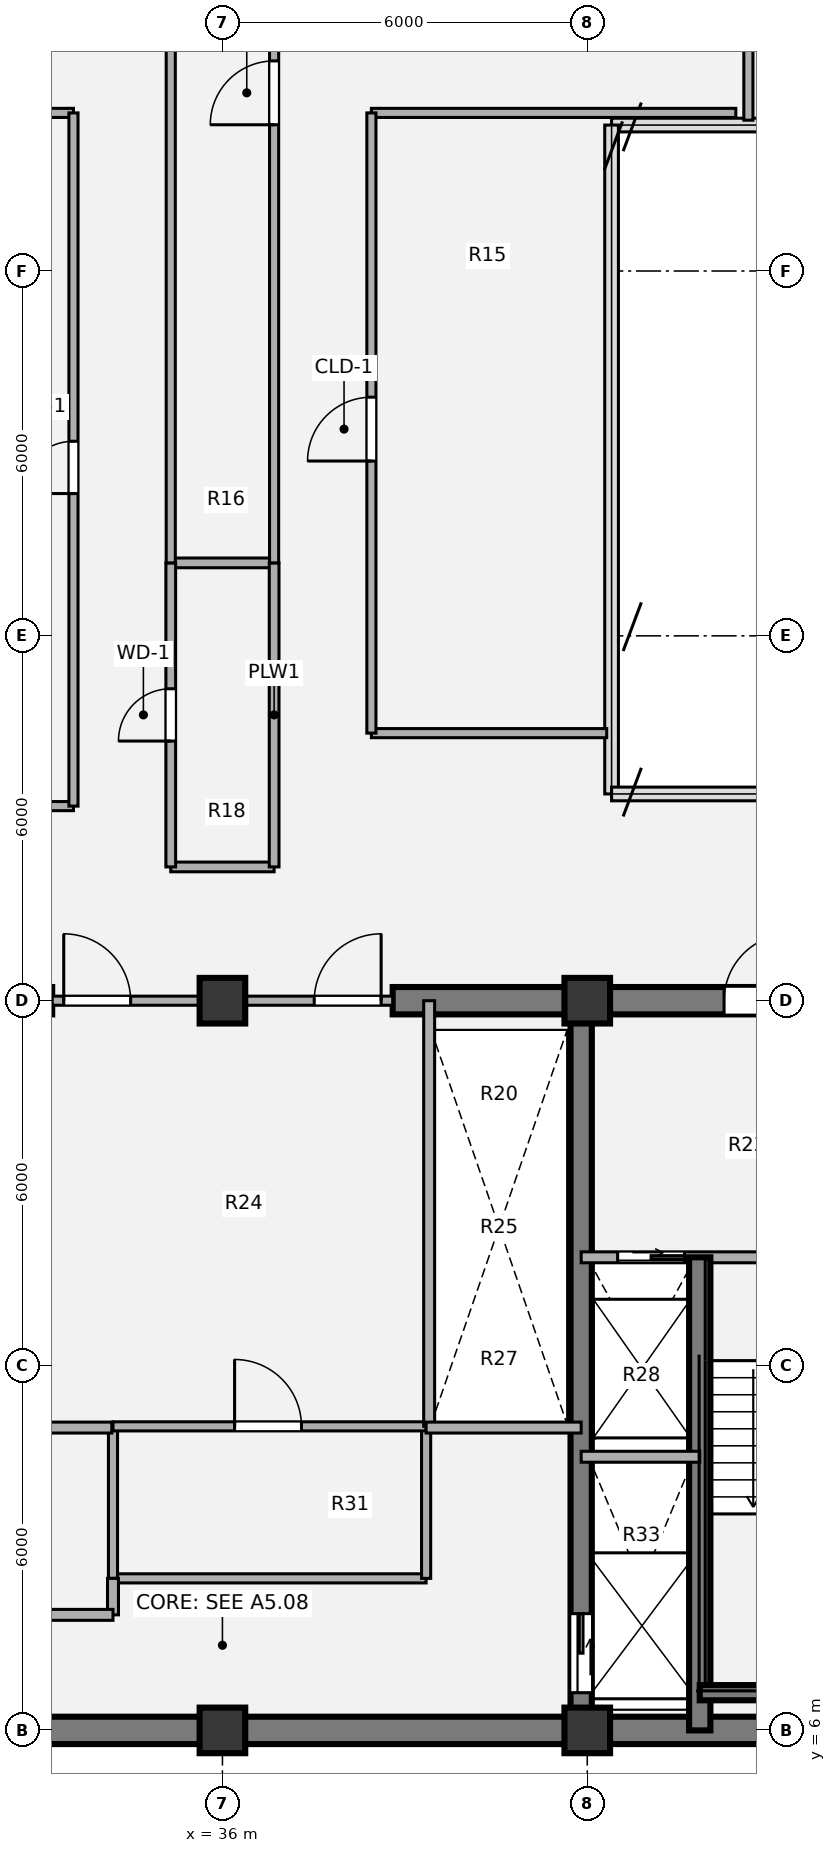
"""IFC4 building model, lengths in metres.
Left out: names, types, materials, properties, quantities, classifications, styles, units other than length and angle.
Written with IfcOpenShell. Run it as: python <this file> out.ifc"""

import sys

from ifc_helpers import new_model, si_unit, direction, frame, frame_2d, origin, origin_2d, place, context, subcontext, project, spatial, rectangle, extrude, source, transform, mapped, element, fill, save


model = new_model("IFC4")
c1 = context("Model", 3, precision=1e-05, world=origin(), true_north=direction((0.0, 1.0)))
c2 = subcontext(c1, "Body", "Model", "MODEL_VIEW")
j1 = project(units=[si_unit("LENGTHUNIT", "METRE"), si_unit("PLANEANGLEUNIT", "RADIAN")], contexts=[c1])
p1 = place(None, origin())
s1 = spatial("IfcSite", under=j1, at=p1, CompositionType="ELEMENT")
p2 = place(p1, origin())
s2 = spatial("IfcBuilding", under=s1, at=p2, CompositionType="ELEMENT")
p3 = place(p2, frame((0.0, 0.0, 179.1)))
s3 = spatial("IfcBuildingStorey", under=s2, at=p3, CompositionType="ELEMENT", Elevation=179.1)
m1 = source(origin(), c2, "Body", "SweptSolid", [
    extrude(rectangle(XDim=0.75, YDim=0.75, at=origin_2d()), origin(), (0.0, 0.0, 1.0), 3.78),
])
for number, where, z_axis, x_axis in (
    (1, (36.0, 6.0, 0.0), (0.0, 0.0, 1.0), (1.0, 0.0, 0.0)),
    (2, (42.0, 6.0, 0.0), (0.0, 0.0, 1.0), (1.0, 0.0, 0.0)),
    (3, (36.0, 18.0, 0.0), (0.0, 0.0, 1.0), (1.0, 0.0, 0.0)),
    (4, (42.0, 18.0, 0.0), (0.0, 0.0, 1.0), (1.0, 0.0, 0.0)),
):
    element("IfcColumn", number, at=place(p3, frame(where, z_axis=z_axis, x_axis=x_axis)), inside=s3, PredefinedType="COLUMN", context=c2, shape_type="MappedRepresentation", body=[
        mapped(m1, transform((0.0, 0.0, 0.0), x_axis=(1.0, 0.0, 0.0), y_axis=(0.0, 1.0, 0.0), z_axis=(0.0, 0.0, 1.0), scale=1.0)),
    ])
p4 = place(p3, frame((48.225, 6.0, 0.0), z_axis=(0.0, 0.0, 1.0), x_axis=(-1.0, 0.0, 0.0)))
e5 = element("IfcWall", 5, at=p4, inside=s3, PredefinedType="SHEAR", context=c2, shape_type="SweptSolid", body=[
    extrude(rectangle(XDim=24.45, YDim=0.45, at=frame_2d((12.225, 0.0))), origin(), (0.0, 0.0, 1.0), 3.78),
])
p5 = place(p3, frame((38.8, 18.0, 0.0), z_axis=(0.0, 0.0, 1.0), x_axis=(1.0, 0.0, 0.0)))
e6 = element("IfcWall", 6, at=p5, inside=s3, PredefinedType="SHEAR", context=c2, shape_type="SweptSolid", body=[
    extrude(rectangle(XDim=9.425, YDim=0.45, at=frame_2d((4.712, 0.0))), origin(), (0.0, 0.0, 1.0), 3.78),
])
p6 = place(p5, frame((5.45, 0.0, 0.0)))
e7 = element("IfcOpeningElement", 7, at=p6, cuts=e6, PredefinedType="OPENING", context=c2, shape_type="SweptSolid", body=[
    extrude(rectangle(XDim=1.1, YDim=2.1, at=origin_2d()), frame((0.55, 0.235, 1.05), z_axis=(0.0, -1.0, 0.0), x_axis=(1.0, 0.0, 0.0)), (0.0, 0.0, 1.0), 0.47),
])
p7 = place(p3, frame((41.9, 18.0, 0.0), z_axis=(0.0, 0.0, 1.0), x_axis=(0.0, -1.0, 0.0)))
e8 = element("IfcWall", 8, at=p7, inside=s3, PredefinedType="SHEAR", context=c2, shape_type="SweptSolid", body=[
    extrude(rectangle(XDim=12.0, YDim=0.35, at=frame_2d((6.0, 0.0))), origin(), (0.0, 0.0, 1.0), 3.78),
])
p8 = place(p7, frame((10.08, 0.0, 0.0)))
e9 = element("IfcOpeningElement", 9, at=p8, cuts=e8, PredefinedType="OPENING", context=c2, shape_type="SweptSolid", body=[
    extrude(rectangle(XDim=1.3, YDim=2.1, at=origin_2d()), frame((0.65, 0.185, 1.05), z_axis=(0.0, -1.0, 0.0), x_axis=(1.0, 0.0, 0.0)), (0.0, 0.0, 1.0), 0.37),
])
p9 = place(p3, frame((34.2, 8.5, 0.0), z_axis=(0.0, 0.0, 1.0), x_axis=(1.0, 0.0, 0.0)))
e10 = element("IfcWall", 10, at=p9, inside=s3, PredefinedType="PARTITIONING", context=c2, shape_type="SweptSolid", body=[
    extrude(rectangle(XDim=5.15, YDim=0.15, at=frame_2d((2.575, 0.0))), origin(), (0.0, 0.0, 1.0), 3.5),
])
for number, where, z_axis, x_axis in (
    (11, (34.2, 8.5, 0.0), (0.0, 0.0, 1.0), (0.0, 1.0, 0.0)),
    (12, (39.35, 8.5, 0.0), (0.0, 0.0, 1.0), (0.0, 1.0, 0.0)),
):
    element("IfcWall", number, at=place(p3, frame(where, z_axis=z_axis, x_axis=x_axis)), inside=s3, PredefinedType="PARTITIONING", context=c2, shape_type="SweptSolid", body=[
        extrude(rectangle(XDim=2.5, YDim=0.15, at=frame_2d((1.25, 0.0))), origin(), (0.0, 0.0, 1.0), 3.5),
    ])
p10 = place(p3, frame((34.2, 11.0, 0.0), z_axis=(0.0, 0.0, 1.0), x_axis=(1.0, 0.0, 0.0)))
e13 = element("IfcWall", 13, at=p10, inside=s3, PredefinedType="PARTITIONING", context=c2, shape_type="SweptSolid", body=[
    extrude(rectangle(XDim=5.15, YDim=0.15, at=frame_2d((2.575, 0.0))), origin(), (0.0, 0.0, 1.0), 3.5),
])
p11 = place(p10, frame((2.0, 0.0, 0.0)))
e14 = element("IfcOpeningElement", 14, at=p11, cuts=e13, PredefinedType="OPENING", context=c2, shape_type="SweptSolid", body=[
    extrude(rectangle(XDim=1.1, YDim=2.1, at=origin_2d()), frame((0.55, 0.085, 1.05), z_axis=(0.0, -1.0, 0.0), x_axis=(1.0, 0.0, 0.0)), (0.0, 0.0, 1.0), 0.17),
])
p12 = place(p3, frame((39.4, 11.0, 0.0), z_axis=(0.0, 0.0, 1.0), x_axis=(0.0, 1.0, 0.0)))
e15 = element("IfcWall", 15, at=p12, inside=s3, PredefinedType="PARTITIONING", context=c2, shape_type="SweptSolid", body=[
    extrude(rectangle(XDim=7.0, YDim=0.18, at=frame_2d((3.5, 0.0))), origin(), (0.0, 0.0, 1.0), 3.5),
])
p13 = place(p3, frame((30.1, 10.98, 0.0), z_axis=(0.0, 0.0, 1.0), x_axis=(1.0, 0.0, 0.0)))
e16 = element("IfcWall", 16, at=p13, inside=s3, PredefinedType="PARTITIONING", context=c2, shape_type="SweptSolid", body=[
    extrude(rectangle(XDim=4.08, YDim=0.18, at=frame_2d((2.04, 0.0))), origin(), (0.0, 0.0, 1.0), 3.5),
])
p14 = place(p3, frame((34.2, 7.9, 0.0), z_axis=(0.0, 0.0, 1.0), x_axis=(0.0, 1.0, 0.0)))
e17 = element("IfcWall", 17, at=p14, inside=s3, PredefinedType="PARTITIONING", context=c2, shape_type="SweptSolid", body=[
    extrude(rectangle(XDim=0.6, YDim=0.18, at=frame_2d((0.3, 0.0))), origin(), (0.0, 0.0, 1.0), 3.5),
])
p15 = place(p3, frame((32.6, 7.9, 0.0), z_axis=(0.0, 0.0, 1.0), x_axis=(1.0, 0.0, 0.0)))
e18 = element("IfcWall", 18, at=p15, inside=s3, PredefinedType="PARTITIONING", context=c2, shape_type="SweptSolid", body=[
    extrude(rectangle(XDim=1.6, YDim=0.18, at=frame_2d((0.8, 0.0))), origin(), (0.0, 0.0, 1.0), 3.5),
])
p16 = place(p3, frame((39.35, 10.98, 0.0), z_axis=(0.0, 0.0, 1.0), x_axis=(1.0, 0.0, 0.0)))
e19 = element("IfcWall", 19, at=p16, inside=s3, PredefinedType="PARTITIONING", context=c2, shape_type="SweptSolid", body=[
    extrude(rectangle(XDim=2.55, YDim=0.18, at=frame_2d((1.275, 0.0))), origin(), (0.0, 0.0, 1.0), 3.5),
])
p17 = place(p3, frame((33.2, 18.0, 0.0), z_axis=(0.0, 0.0, 1.0), x_axis=(1.0, 0.0, 0.0)))
e20 = element("IfcWall", 20, at=p17, inside=s3, PredefinedType="PARTITIONING", context=c2, shape_type="SweptSolid", body=[
    extrude(rectangle(XDim=5.6, YDim=0.15, at=frame_2d((2.8, 0.0))), origin(), (0.0, 0.0, 1.0), 2.515),
])
p18 = place(p17, frame((0.19, 0.0, 0.0)))
e21 = element("IfcOpeningElement", 21, at=p18, cuts=e20, PredefinedType="OPENING", context=c2, shape_type="SweptSolid", body=[
    extrude(rectangle(XDim=1.1, YDim=2.1, at=origin_2d()), frame((0.55, 0.085, 1.05), z_axis=(0.0, -1.0, 0.0), x_axis=(1.0, 0.0, 0.0)), (0.0, 0.0, 1.0), 0.17),
])
p19 = place(p17, frame((4.31, 0.0, 0.0)))
e22 = element("IfcOpeningElement", 22, at=p19, cuts=e20, PredefinedType="OPENING", context=c2, shape_type="SweptSolid", body=[
    extrude(rectangle(XDim=1.1, YDim=2.1, at=origin_2d()), frame((0.55, 0.085, 1.05), z_axis=(0.0, -1.0, 0.0), x_axis=(1.0, 0.0, 0.0)), (0.0, 0.0, 1.0), 0.17),
])
p20 = place(p3, frame((41.9, 13.78, 0.0), z_axis=(0.0, 0.0, 1.0), x_axis=(1.0, 0.0, 0.0)))
e23 = element("IfcWall", 23, at=p20, inside=s3, PredefinedType="PARTITIONING", context=c2, shape_type="SweptSolid", body=[
    extrude(rectangle(XDim=6.1, YDim=0.18, at=frame_2d((3.05, 0.0))), origin(), (0.0, 0.0, 1.0), 3.5),
])
p21 = place(p20, frame((0.6, 0.0, 0.0)))
e24 = element("IfcOpeningElement", 24, at=p21, cuts=e23, PredefinedType="OPENING", context=c2, shape_type="SweptSolid", body=[
    extrude(rectangle(XDim=1.1, YDim=2.1, at=origin_2d()), frame((0.55, 0.1, 1.05), z_axis=(0.0, -1.0, 0.0), x_axis=(1.0, 0.0, 0.0)), (0.0, 0.0, 1.0), 0.2),
])
p22 = place(p20, frame((3.8, 0.0, 0.0)))
e25 = element("IfcOpeningElement", 25, at=p22, cuts=e23, PredefinedType="OPENING", context=c2, shape_type="SweptSolid", body=[
    extrude(rectangle(XDim=1.1, YDim=2.1, at=origin_2d()), frame((0.55, 0.1, 1.05), z_axis=(0.0, -1.0, 0.0), x_axis=(1.0, 0.0, 0.0)), (0.0, 0.0, 1.0), 0.2),
])
p23 = place(p3, frame((43.85, 6.0, 0.0), z_axis=(0.0, 0.0, 1.0), x_axis=(0.0, 1.0, 0.0)))
e26 = element("IfcWall", 26, at=p23, inside=s3, PredefinedType="SHEAR", context=c2, shape_type="SweptSolid", body=[
    extrude(rectangle(XDim=7.78, YDim=0.35, at=frame_2d((3.89, 0.0))), origin(), (0.0, 0.0, 1.0), 3.85),
])
p24 = place(p3, frame((43.85, 6.62, 0.0), z_axis=(0.0, 0.0, 1.0), x_axis=(1.0, 0.0, 0.0)))
e27 = element("IfcWall", 27, at=p24, inside=s3, PredefinedType="SHEAR", context=c2, shape_type="SweptSolid", body=[
    extrude(rectangle(XDim=3.57, YDim=0.25, at=frame_2d((1.785, 0.0))), origin(), (0.0, 0.0, 1.0), 3.85),
])
p25 = place(p3, frame((41.9, 10.5, 0.0), z_axis=(0.0, 0.0, 1.0), x_axis=(1.0, 0.0, 0.0)))
e28 = element("IfcWall", 28, at=p25, inside=s3, PredefinedType="PARTITIONING", context=c2, shape_type="SweptSolid", body=[
    extrude(rectangle(XDim=1.95, YDim=0.18, at=frame_2d((0.975, 0.0))), origin(), (0.0, 0.0, 1.0), 3.5),
])
p26 = place(p3, frame((35.15, 20.2, 0.0), z_axis=(0.0, 0.0, 1.0), x_axis=(1.0, 0.0, 0.0)))
e29 = element("IfcWall", 29, at=p26, inside=s3, PredefinedType="PLUMBINGWALL", context=c2, shape_type="SweptSolid", body=[
    extrude(rectangle(XDim=1.7, YDim=0.16, at=frame_2d((0.85, 0.0))), origin(), (0.0, 0.0, 1.0), 3.5),
])
p27 = place(p3, frame((27.558, 21.2, 0.0), z_axis=(0.0, 0.0, 1.0), x_axis=(1.0, 0.0, 0.0)))
e30 = element("IfcWall", 30, at=p27, inside=s3, PredefinedType="PARTITIONING", context=c2, shape_type="SweptSolid", body=[
    extrude(rectangle(XDim=5.992, YDim=0.15, at=frame_2d((2.996, 0.0))), origin(), (0.0, 0.0, 1.0), 3.5),
])
p28 = place(p3, frame((38.45, 22.4, 0.0), z_axis=(0.0, 0.0, 1.0), x_axis=(1.0, 0.0, 0.0)))
e31 = element("IfcWall", 31, at=p28, inside=s3, PredefinedType="PARTITIONING", context=c2, shape_type="SweptSolid", body=[
    extrude(rectangle(XDim=3.87, YDim=0.15, at=frame_2d((1.935, 0.0))), origin(), (0.0, 0.0, 1.0), 3.5),
])
p29 = place(p3, frame((35.15, 25.2, 0.0), z_axis=(0.0, 0.0, 1.0), x_axis=(1.0, 0.0, 0.0)))
e32 = element("IfcWall", 32, at=p29, inside=s3, PredefinedType="PLUMBINGWALL", context=c2, shape_type="SweptSolid", body=[
    extrude(rectangle(XDim=1.7, YDim=0.16, at=frame_2d((0.85, 0.0))), origin(), (0.0, 0.0, 1.0), 3.5),
])
p30 = place(p3, frame((27.557, 32.6, 0.0), z_axis=(0.0, 0.0, 1.0), x_axis=(1.0, 0.0, 0.0)))
e33 = element("IfcWall", 33, at=p30, inside=s3, PredefinedType="PARTITIONING", context=c2, shape_type="SweptSolid", body=[
    extrude(rectangle(XDim=5.993, YDim=0.15, at=frame_2d((2.997, 0.0))), origin(), (0.0, 0.0, 1.0), 3.5),
])
p31 = place(p3, frame((38.45, 32.6, 0.0), z_axis=(0.0, 0.0, 1.0), x_axis=(1.0, 0.0, 0.0)))
e34 = element("IfcWall", 34, at=p31, inside=s3, PredefinedType="PARTITIONING", context=c2, shape_type="SweptSolid", body=[
    extrude(rectangle(XDim=5.993, YDim=0.15, at=frame_2d((2.997, 0.0))), origin(), (0.0, 0.0, 1.0), 3.5),
])
p32 = place(p3, frame((33.55, 21.2, 0.0), z_axis=(0.0, 0.0, 1.0), x_axis=(0.0, 1.0, 0.0)))
e35 = element("IfcWall", 35, at=p32, inside=s3, PredefinedType="PARTITIONING", context=c2, shape_type="SweptSolid", body=[
    extrude(rectangle(XDim=11.4, YDim=0.15, at=frame_2d((5.7, 0.0))), origin(), (0.0, 0.0, 1.0), 3.5),
])
p33 = place(p32, frame((5.14, 0.0, 0.0)))
e36 = element("IfcOpeningElement", 36, at=p33, cuts=e35, PredefinedType="OPENING", context=c2, shape_type="SweptSolid", body=[
    extrude(rectangle(XDim=0.86, YDim=2.1, at=origin_2d()), frame((0.43, 0.085, 1.05), z_axis=(0.0, -1.0, 0.0), x_axis=(1.0, 0.0, 0.0)), (0.0, 0.0, 1.0), 0.17),
])
p34 = place(p3, frame((35.15, 20.2, 0.0), z_axis=(0.0, 0.0, 1.0), x_axis=(0.0, 1.0, 0.0)))
e37 = element("IfcWall", 37, at=p34, inside=s3, PredefinedType="PLUMBINGWALL", context=c2, shape_type="SweptSolid", body=[
    extrude(rectangle(XDim=5.0, YDim=0.16, at=frame_2d((2.5, 0.0))), origin(), (0.0, 0.0, 1.0), 3.5),
])
p35 = place(p34, frame((2.07, 0.0, 0.0)))
e38 = element("IfcOpeningElement", 38, at=p35, cuts=e37, PredefinedType="OPENING", context=c2, shape_type="SweptSolid", body=[
    extrude(rectangle(XDim=0.86, YDim=2.1, at=origin_2d()), frame((0.43, 0.09, 1.05), z_axis=(0.0, -1.0, 0.0), x_axis=(1.0, 0.0, 0.0)), (0.0, 0.0, 1.0), 0.18),
])
p36 = place(p3, frame((35.15, 25.2, 0.0), z_axis=(0.0, 0.0, 1.0), x_axis=(0.0, 1.0, 0.0)))
e39 = element("IfcWall", 39, at=p36, inside=s3, PredefinedType="PARTITIONING", context=c2, shape_type="SweptSolid", body=[
    extrude(rectangle(XDim=15.46, YDim=0.15, at=frame_2d((7.73, 0.0))), origin(), (0.0, 0.0, 1.0), 3.5),
])
p37 = place(p3, frame((36.85, 20.2, 0.0), z_axis=(0.0, 0.0, 1.0), x_axis=(0.0, 1.0, 0.0)))
e40 = element("IfcWall", 40, at=p37, inside=s3, PredefinedType="PLUMBINGWALL", context=c2, shape_type="SweptSolid", body=[
    extrude(rectangle(XDim=5.0, YDim=0.16, at=frame_2d((2.5, 0.0))), origin(), (0.0, 0.0, 1.0), 3.5),
])
p38 = place(p3, frame((36.85, 25.2, 0.0), z_axis=(0.0, 0.0, 1.0), x_axis=(0.0, 1.0, 0.0)))
e41 = element("IfcWall", 41, at=p38, inside=s3, PredefinedType="PARTITIONING", context=c2, shape_type="SweptSolid", body=[
    extrude(rectangle(XDim=15.46, YDim=0.15, at=frame_2d((7.73, 0.0))), origin(), (0.0, 0.0, 1.0), 3.5),
])
p39 = place(p38, frame((7.205, 0.0, 0.0)))
e42 = element("IfcOpeningElement", 42, at=p39, cuts=e41, PredefinedType="OPENING", context=c2, shape_type="SweptSolid", body=[
    extrude(rectangle(XDim=1.05, YDim=2.1, at=origin_2d()), frame((0.525, 0.085, 1.05), z_axis=(0.0, -1.0, 0.0), x_axis=(1.0, 0.0, 0.0)), (0.0, 0.0, 1.0), 0.17),
])
p40 = place(p3, frame((38.45, 22.4, 0.0), z_axis=(0.0, 0.0, 1.0), x_axis=(0.0, 1.0, 0.0)))
e43 = element("IfcWall", 43, at=p40, inside=s3, PredefinedType="PARTITIONING", context=c2, shape_type="SweptSolid", body=[
    extrude(rectangle(XDim=10.2, YDim=0.15, at=frame_2d((5.1, 0.0))), origin(), (0.0, 0.0, 1.0), 3.5),
])
p41 = place(p40, frame((4.475, 0.0, 0.0)))
e44 = element("IfcOpeningElement", 44, at=p41, cuts=e43, PredefinedType="OPENING", context=c2, shape_type="SweptSolid", body=[
    extrude(rectangle(XDim=1.05, YDim=2.1, at=origin_2d()), frame((0.525, 0.085, 1.05), z_axis=(0.0, -1.0, 0.0), x_axis=(1.0, 0.0, 0.0)), (0.0, 0.0, 1.0), 0.17),
])
p42 = place(p3, frame((44.65, 32.48, 0.0), z_axis=(0.0, 0.0, 1.0), x_axis=(0.0, 1.0, 0.0)))
e45 = element("IfcWall", 45, at=p42, inside=s3, PredefinedType="PARTITIONING", context=c2, shape_type="SweptSolid", body=[
    extrude(rectangle(XDim=3.921, YDim=0.15, at=frame_2d((1.96, 0.0))), origin(), (0.0, 0.0, 1.0), 3.5),
])
p43 = place(p42, frame((1.56, 0.0, 0.0)))
e46 = element("IfcOpeningElement", 46, at=p43, cuts=e45, PredefinedType="OPENING", context=c2, shape_type="SweptSolid", body=[
    extrude(rectangle(XDim=0.86, YDim=2.1, at=origin_2d()), frame((0.43, 0.085, 1.05), z_axis=(0.0, -1.0, 0.0), x_axis=(1.0, 0.0, 0.0)), (0.0, 0.0, 1.0), 0.17),
])
m2 = source(origin(), c2, "Body", "SweptSolid", [
    extrude(rectangle(XDim=1.1, YDim=2.1, at=origin_2d()), frame((0.55, 0.025, 1.05), z_axis=(0.0, -1.0, 0.0), x_axis=(1.0, 0.0, 0.0)), (0.0, 0.0, 1.0), 0.05),
])
p44 = place(p11, origin())
e47 = element("IfcDoor", 47, at=p44, inside=s3, OperationType="SINGLE_SWING_LEFT", PredefinedType="DOOR", context=c2, shape_type="MappedRepresentation", body=[
    mapped(m2, transform((0.0, 0.0, 0.0), x_axis=(1.0, 0.0, 0.0), y_axis=(0.0, 1.0, 0.0), z_axis=(0.0, 0.0, 1.0), scale=1.0)),
])
fill(e14, e47)
m3 = source(origin(), c2, "Body", "SweptSolid", [
    extrude(rectangle(XDim=1.1, YDim=2.1, at=origin_2d()), frame((0.55, 0.025, 1.05), z_axis=(0.0, -1.0, 0.0), x_axis=(1.0, 0.0, 0.0)), (0.0, 0.0, 1.0), 0.05),
])
p45 = place(p18, origin())
e48 = element("IfcDoor", 48, at=p45, inside=s3, OperationType="SINGLE_SWING_LEFT", PredefinedType="DOOR", context=c2, shape_type="MappedRepresentation", body=[
    mapped(m3, transform((0.0, 0.0, 0.0), x_axis=(1.0, 0.0, 0.0), y_axis=(0.0, 1.0, 0.0), z_axis=(0.0, 0.0, 1.0), scale=1.0)),
])
fill(e21, e48)
p46 = place(p19, origin())
e49 = element("IfcDoor", 49, at=p46, inside=s3, OperationType="SINGLE_SWING_RIGHT", PredefinedType="DOOR", context=c2, shape_type="MappedRepresentation", body=[
    mapped(m3, transform((0.0, 0.0, 0.0), x_axis=(1.0, 0.0, 0.0), y_axis=(0.0, 1.0, 0.0), z_axis=(0.0, 0.0, 1.0), scale=1.0)),
])
fill(e22, e49)
m4 = source(origin(), c2, "Body", "SweptSolid", [
    extrude(rectangle(XDim=1.1, YDim=2.1, at=origin_2d()), frame((0.55, 0.025, 1.05), z_axis=(0.0, -1.0, 0.0), x_axis=(1.0, 0.0, 0.0)), (0.0, 0.0, 1.0), 0.05),
])
p47 = place(p21, origin())
e50 = element("IfcDoor", 50, at=p47, inside=s3, OperationType="SLIDING_TO_RIGHT", PredefinedType="DOOR", context=c2, shape_type="MappedRepresentation", body=[
    mapped(m4, transform((0.0, 0.0, 0.0), x_axis=(1.0, 0.0, 0.0), y_axis=(0.0, 1.0, 0.0), z_axis=(0.0, 0.0, 1.0), scale=1.0)),
])
fill(e24, e50)
m5 = source(origin(), c2, "Body", "SweptSolid", [
    extrude(rectangle(XDim=1.3, YDim=2.1, at=origin_2d()), frame((0.65, 0.025, 1.05), z_axis=(0.0, -1.0, 0.0), x_axis=(1.0, 0.0, 0.0)), (0.0, 0.0, 1.0), 0.05),
])
p48 = place(p8, origin())
e51 = element("IfcDoor", 51, at=p48, inside=s3, OperationType="SLIDING_TO_LEFT", PredefinedType="DOOR", context=c2, shape_type="MappedRepresentation", body=[
    mapped(m5, transform((0.0, 0.0, 0.0), x_axis=(1.0, 0.0, 0.0), y_axis=(0.0, 1.0, 0.0), z_axis=(0.0, 0.0, 1.0), scale=1.0)),
])
fill(e9, e51)
p49 = place(p6, origin())
e52 = element("IfcDoor", 52, at=p49, inside=s3, OperationType="SINGLE_SWING_RIGHT", PredefinedType="DOOR", context=c2, shape_type="MappedRepresentation", body=[
    mapped(m3, transform((0.0, 0.0, 0.0), x_axis=(1.0, 0.0, 0.0), y_axis=(0.0, 1.0, 0.0), z_axis=(0.0, 0.0, 1.0), scale=1.0)),
])
fill(e7, e52)
m6 = source(origin(), c2, "Body", "SweptSolid", [
    extrude(rectangle(XDim=0.86, YDim=2.1, at=origin_2d()), frame((0.43, 0.025, 1.05), z_axis=(0.0, -1.0, 0.0), x_axis=(1.0, 0.0, 0.0)), (0.0, 0.0, 1.0), 0.05),
])
p50 = place(p33, origin())
e53 = element("IfcDoor", 53, at=p50, inside=s3, OperationType="SINGLE_SWING_LEFT", PredefinedType="DOOR", context=c2, shape_type="MappedRepresentation", body=[
    mapped(m6, transform((0.0, 0.0, 0.0), x_axis=(1.0, 0.0, 0.0), y_axis=(0.0, 1.0, 0.0), z_axis=(0.0, 0.0, 1.0), scale=1.0)),
])
fill(e36, e53)
m7 = source(origin(), c2, "Body", "SweptSolid", [
    extrude(rectangle(XDim=0.86, YDim=2.1, at=origin_2d()), frame((0.43, 0.025, 1.05), z_axis=(0.0, -1.0, 0.0), x_axis=(1.0, 0.0, 0.0)), (0.0, 0.0, 1.0), 0.05),
])
p51 = place(p35, origin())
e54 = element("IfcDoor", 54, at=p51, inside=s3, OperationType="SINGLE_SWING_LEFT", PredefinedType="DOOR", context=c2, shape_type="MappedRepresentation", body=[
    mapped(m7, transform((0.0, 0.0, 0.0), x_axis=(1.0, 0.0, 0.0), y_axis=(0.0, 1.0, 0.0), z_axis=(0.0, 0.0, 1.0), scale=1.0)),
])
fill(e38, e54)
m8 = source(origin(), c2, "Body", "SweptSolid", [
    extrude(rectangle(XDim=1.05, YDim=2.1, at=origin_2d()), frame((0.525, 0.025, 1.05), z_axis=(0.0, -1.0, 0.0), x_axis=(1.0, 0.0, 0.0)), (0.0, 0.0, 1.0), 0.05),
])
p52 = place(p39, origin())
e55 = element("IfcDoor", 55, at=p52, inside=s3, OperationType="SINGLE_SWING_LEFT", PredefinedType="DOOR", context=c2, shape_type="MappedRepresentation", body=[
    mapped(m8, transform((0.0, 0.0, 0.0), x_axis=(1.0, 0.0, 0.0), y_axis=(0.0, 1.0, 0.0), z_axis=(0.0, 0.0, 1.0), scale=1.0)),
])
fill(e42, e55)
p53 = place(p41, origin())
e56 = element("IfcDoor", 56, at=p53, inside=s3, OperationType="SINGLE_SWING_LEFT", PredefinedType="DOOR", context=c2, shape_type="MappedRepresentation", body=[
    mapped(m8, transform((0.0, 0.0, 0.0), x_axis=(1.0, 0.0, 0.0), y_axis=(0.0, 1.0, 0.0), z_axis=(0.0, 0.0, 1.0), scale=1.0)),
])
fill(e44, e56)
save(model, sys.argv[1])
